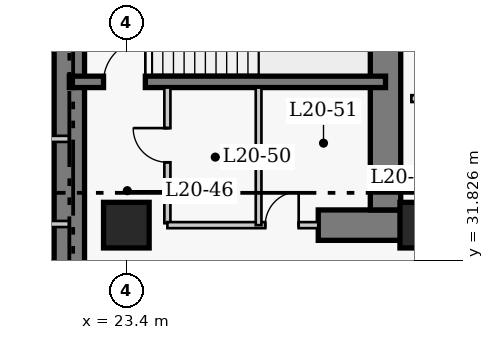
"""IFC4 building model, lengths in metres.
Left out: names, types, materials, properties, quantities, classifications, styles, units other than length and angle.
Written with IfcOpenShell. Run it as: python <this file> out.ifc"""

import sys

from ifc_helpers import new_model, si_unit, direction, frame, frame_2d, origin, origin_2d, place, context, subcontext, project, spatial, rectangle, extrude, element, fill, save


model = new_model("IFC4")
c1 = context("Model", 3, precision=1e-05, world=origin(), true_north=direction((0.0, 1.0)))
c2 = subcontext(c1, "Body", "Model", "MODEL_VIEW")
j1 = project(units=[si_unit("LENGTHUNIT", "METRE"), si_unit("PLANEANGLEUNIT", "RADIAN")], contexts=[c1])
p1 = place(None, origin())
s1 = spatial("IfcSite", under=j1, at=p1, CompositionType="ELEMENT")
p2 = place(p1, origin())
s2 = spatial("IfcBuilding", under=s1, at=p2, CompositionType="ELEMENT")
p3 = place(p2, frame((0.0, 0.0, 84.2)))
s3 = spatial("IfcBuildingStorey", under=s2, at=p3, CompositionType="ELEMENT", Elevation=84.2)
p4 = place(p3, frame((21.9, 27.05, 0.0), z_axis=(0.0, 0.0, 1.0), x_axis=(0.0, 1.0, 0.0)))
e1 = element("IfcWall", 1, at=p4, inside=s3, PredefinedType="SHEAR", context=c2, shape_type="SweptSolid", body=[
    extrude(rectangle(XDim=13.67, YDim=0.8, at=frame_2d((6.835, 0.0))), origin(), (0.0, 0.0, 1.0), 3.8),
])
p5 = place(p3, frame((28.45, 32.75, 0.0), z_axis=(0.0, 0.0, 1.0), x_axis=(1.0, 0.0, 0.0)))
e2 = element("IfcWall", 2, at=p5, inside=s3, PredefinedType="SHEAR", context=c2, shape_type="SweptSolid", body=[
    extrude(rectangle(XDim=2.4, YDim=0.8, at=frame_2d((1.2, 0.0))), origin(), (0.0, 0.0, 1.0), 3.8),
])
p6 = place(p3, frame((30.22, 33.15, 0.0), z_axis=(0.0, 0.0, 1.0), x_axis=(0.0, 1.0, 0.0)))
e3 = element("IfcWall", 3, at=p6, inside=s3, PredefinedType="SHEAR", context=c2, shape_type="SweptSolid", body=[
    extrude(rectangle(XDim=7.17, YDim=0.8, at=frame_2d((3.585, 0.0))), origin(), (0.0, 0.0, 1.0), 3.8),
])
p7 = place(p3, frame((21.9, 36.52, 0.0), z_axis=(0.0, 0.0, 1.0), x_axis=(1.0, 0.0, 0.0)))
e4 = element("IfcWall", 4, at=p7, inside=s3, PredefinedType="SHEAR", context=c2, shape_type="SweptSolid", body=[
    extrude(rectangle(XDim=8.32, YDim=0.3, at=frame_2d((4.16, 0.0))), origin(), (0.0, 0.0, 1.0), 3.8),
])
p8 = place(p7, frame((0.9, 0.0, 0.0)))
e5 = element("IfcOpeningElement", 5, at=p8, cuts=e4, PredefinedType="OPENING", context=c2, shape_type="SweptSolid", body=[
    extrude(rectangle(XDim=1.1, YDim=2.15, at=frame_2d((0.55, 1.075))), frame((0.0, 0.16, 0.0), z_axis=(0.0, -1.0, 0.0), x_axis=(1.0, 0.0, 0.0)), (0.0, 0.0, 1.0), 0.32),
])
for number, where, z_axis, x_axis in (
    (6, (23.4, 32.75, 0.0), (0.0, 0.0, 1.0), (1.0, 0.0, 0.0)),
    (7, (31.2, 32.75, 0.0), (0.0, 0.0, 1.0), (1.0, 0.0, 0.0)),
):
    element("IfcColumn", number, at=place(p3, frame(where, z_axis=z_axis, x_axis=x_axis)), inside=s3, PredefinedType="COLUMN", context=c2, shape_type="SweptSolid", body=[
        extrude(rectangle(XDim=1.2, YDim=1.2, at=origin_2d()), origin(), (0.0, 0.0, 1.0), 3.8),
    ])
p9 = place(p3, frame((30.9, 36.08, 0.0), z_axis=(0.0, 0.0, 1.0), x_axis=(1.0, 0.0, 0.0)))
e8 = element("IfcWall", 8, at=p9, inside=s3, PredefinedType="PARTITIONING", context=c2, shape_type="SweptSolid", body=[
    extrude(rectangle(XDim=1.85, YDim=0.18, at=frame_2d((0.925, 0.0))), origin(), (0.0, 0.0, 1.0), 3.54),
])
p10 = place(p9, frame((0.48, 0.0, 0.0)))
e9 = element("IfcOpeningElement", 9, at=p10, cuts=e8, PredefinedType="OPENING", context=c2, shape_type="SweptSolid", body=[
    extrude(rectangle(XDim=0.9, YDim=2.15, at=frame_2d((0.45, 1.075))), frame((0.0, 0.1, 0.0), z_axis=(0.0, -1.0, 0.0), x_axis=(1.0, 0.0, 0.0)), (0.0, 0.0, 1.0), 0.2),
])
p11 = place(p3, frame((24.48, 32.8, 0.0), z_axis=(0.0, 0.0, 1.0), x_axis=(0.0, 1.0, 0.0)))
e10 = element("IfcWall", 10, at=p11, inside=s3, PredefinedType="PARTITIONING", context=c2, shape_type="SweptSolid", body=[
    extrude(rectangle(XDim=3.57, YDim=0.16, at=frame_2d((1.785, 0.0))), origin(), (0.0, 0.0, 1.0), 3.54),
])
p12 = place(p11, frame((1.604, 0.0, 0.0)))
e11 = element("IfcOpeningElement", 11, at=p12, cuts=e10, PredefinedType="OPENING", context=c2, shape_type="SweptSolid", body=[
    extrude(rectangle(XDim=0.9, YDim=2.1, at=frame_2d((0.45, 1.05))), frame((0.0, 0.09, 0.0), z_axis=(0.0, -1.0, 0.0), x_axis=(1.0, 0.0, 0.0)), (0.0, 0.0, 1.0), 0.18),
])
p13 = place(p3, frame((24.48, 32.75, 0.0), z_axis=(0.0, 0.0, 1.0), x_axis=(1.0, 0.0, 0.0)))
e12 = element("IfcWall", 12, at=p13, inside=s3, PredefinedType="PARTITIONING", context=c2, shape_type="SweptSolid", body=[
    extrude(rectangle(XDim=3.97, YDim=0.16, at=frame_2d((1.985, 0.0))), origin(), (0.0, 0.0, 1.0), 3.54),
])
p14 = place(p13, frame((2.575, 0.0, 0.0)))
e13 = element("IfcOpeningElement", 13, at=p14, cuts=e12, PredefinedType="OPENING", context=c2, shape_type="SweptSolid", body=[
    extrude(rectangle(XDim=0.88, YDim=2.05, at=frame_2d((0.44, 1.025))), frame((0.0, 0.09, 0.0), z_axis=(0.0, -1.0, 0.0), x_axis=(1.0, 0.0, 0.0)), (0.0, 0.0, 1.0), 0.18),
])
p15 = place(p3, frame((26.88, 32.75, 0.0), z_axis=(0.0, 0.0, 1.0), x_axis=(0.0, 1.0, 0.0)))
e14 = element("IfcWall", 14, at=p15, inside=s3, PredefinedType="PARTITIONING", context=c2, shape_type="SweptSolid", body=[
    extrude(rectangle(XDim=3.62, YDim=0.15, at=frame_2d((1.81, 0.0))), origin(), (0.0, 0.0, 1.0), 3.54),
])
for number, where, z_axis, x_axis in (
    (15, (19.16, 35.02, 0.0), (0.0, 0.0, 1.0), (1.0, 0.0, 0.0)),
    (16, (19.16, 32.78, 0.0), (0.0, 0.0, 1.0), (1.0, 0.0, 0.0)),
):
    element("IfcWall", number, at=place(p3, frame(where, z_axis=z_axis, x_axis=x_axis)), inside=s3, PredefinedType="PARTITIONING", context=c2, shape_type="SweptSolid", body=[
        extrude(rectangle(XDim=2.74, YDim=0.16, at=frame_2d((1.37, 0.0))), origin(), (0.0, 0.0, 1.0), 3.54),
    ])
p16 = place(p12, origin())
e17 = element("IfcDoor", 17, at=p16, inside=s3, OperationType="SINGLE_SWING_RIGHT", PredefinedType="DOOR", context=c2, shape_type="SweptSolid", body=[
    extrude(rectangle(XDim=0.9, YDim=2.1, at=frame_2d((0.45, 1.05))), frame((0.0, 0.025, 0.0), z_axis=(0.0, -1.0, 0.0), x_axis=(1.0, 0.0, 0.0)), (0.0, 0.0, 1.0), 0.05),
])
fill(e11, e17)
p17 = place(p14, origin())
e18 = element("IfcDoor", 18, at=p17, inside=s3, OperationType="SINGLE_SWING_RIGHT", PredefinedType="DOOR", context=c2, shape_type="SweptSolid", body=[
    extrude(rectangle(XDim=0.88, YDim=2.05, at=frame_2d((0.44, 1.025))), frame((0.0, 0.025, 0.0), z_axis=(0.0, -1.0, 0.0), x_axis=(1.0, 0.0, 0.0)), (0.0, 0.0, 1.0), 0.05),
])
fill(e13, e18)
p18 = place(p8, origin())
e19 = element("IfcDoor", 19, at=p18, inside=s3, OperationType="SINGLE_SWING_RIGHT", PredefinedType="DOOR", context=c2, shape_type="SweptSolid", body=[
    extrude(rectangle(XDim=1.1, YDim=2.15, at=frame_2d((0.55, 1.075))), frame((0.0, 0.025, 0.0), z_axis=(0.0, -1.0, 0.0), x_axis=(1.0, 0.0, 0.0)), (0.0, 0.0, 1.0), 0.05),
])
fill(e5, e19)
save(model, sys.argv[1])
